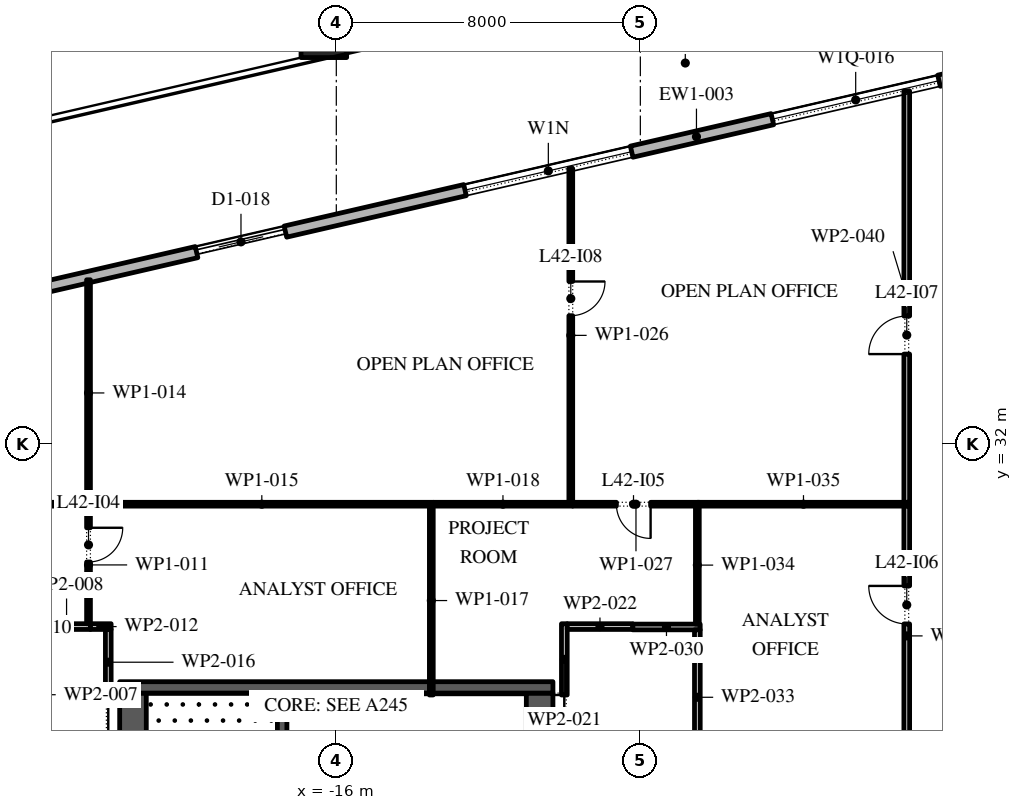
"""IFC4 building model, lengths in metres.
Left out: names, types, materials, properties, quantities, classifications, styles, units other than length and angle.
Written with IfcOpenShell. Run it as: python <this file> out.ifc"""

import sys

from ifc_helpers import new_model, si_unit, direction, frame, frame_2d, origin, origin_2d, place, context, subcontext, project, spatial, rectangle, extrude, element, fill, save


model = new_model("IFC4")
c1 = context("Model", 3, precision=1e-05, world=origin(), true_north=direction((0.0, 1.0)))
c2 = subcontext(c1, "Body", "Model", "MODEL_VIEW")
j1 = project(units=[si_unit("LENGTHUNIT", "METRE"), si_unit("PLANEANGLEUNIT", "RADIAN")], contexts=[c1])
p1 = place(None, origin())
s1 = spatial("IfcSite", under=j1, at=p1, CompositionType="ELEMENT")
p2 = place(p1, origin())
s2 = spatial("IfcBuilding", under=s1, at=p2, CompositionType="ELEMENT")
p3 = place(p2, frame((0.0, 0.0, 192.6)))
s3 = spatial("IfcBuildingStorey", under=s2, at=p3, CompositionType="ELEMENT", Elevation=192.6)
p4 = place(p3, frame((-16.328, 42.772, 0.0), z_axis=(-0.018825755928, 0.08155896722, 0.996490705315), x_axis=(-0.974379530941, -0.22491004798, 0.0)))
e1 = element("IfcColumn", 1, at=p4, inside=s3, PredefinedType="COLUMN", context=c2, shape_type="SweptSolid", body=[
    extrude(rectangle(XDim=1.2, YDim=1.2, at=origin_2d()), origin(), (0.0, 0.0, 1.0), 4.215),
])
p5 = place(p3, frame((17.592, 45.657, 0.0), z_axis=(0.0, 0.0, 1.0), x_axis=(-0.974370243697, -0.224950279389, 0.0)))
e2 = element("IfcWall", 2, at=p5, inside=s3, PredefinedType="STANDARD", context=c2, shape_type="SweptSolid", body=[
    extrude(rectangle(XDim=49.5, YDim=0.3, at=frame_2d((24.75, 0.0))), origin(), (0.0, 0.0, 1.0), 4.0),
])
p6 = place(p5, frame((2.8, 0.0, 0.0)))
e3 = element("IfcOpeningElement", 3, at=p6, cuts=e2, PredefinedType="OPENING", context=c2, shape_type="SweptSolid", body=[
    extrude(rectangle(XDim=2.4, YDim=3.5, at=frame_2d((1.2, 1.75))), frame((0.0, 0.16, 0.0), z_axis=(0.0, -1.0, 0.0), x_axis=(1.0, 0.0, 0.0)), (0.0, 0.0, 1.0), 0.32),
])
p7 = place(p5, frame((9.9, 0.0, 0.45)))
e4 = element("IfcOpeningElement", 4, at=p7, cuts=e2, PredefinedType="OPENING", context=c2, shape_type="SweptSolid", body=[
    extrude(rectangle(XDim=4.5, YDim=2.45, at=frame_2d((2.25, 1.225))), frame((0.0, 0.16, 0.0), z_axis=(0.0, -1.0, 0.0), x_axis=(1.0, 0.0, 0.0)), (0.0, 0.0, 1.0), 0.32),
])
p8 = place(p5, frame((18.2, 0.0, 0.45)))
e5 = element("IfcOpeningElement", 5, at=p8, cuts=e2, PredefinedType="OPENING", context=c2, shape_type="SweptSolid", body=[
    extrude(rectangle(XDim=4.5, YDim=2.45, at=frame_2d((2.25, 1.225))), frame((0.0, 0.16, 0.0), z_axis=(0.0, -1.0, 0.0), x_axis=(1.0, 0.0, 0.0)), (0.0, 0.0, 1.0), 0.32),
])
p9 = place(p5, frame((26.5, 0.0, 0.45)))
e6 = element("IfcOpeningElement", 6, at=p9, cuts=e2, PredefinedType="OPENING", context=c2, shape_type="SweptSolid", body=[
    extrude(rectangle(XDim=4.5, YDim=2.525, at=frame_2d((2.25, 1.262))), frame((0.0, 0.16, 0.0), z_axis=(0.0, -1.0, 0.0), x_axis=(1.0, 0.0, 0.0)), (0.0, 0.0, 1.0), 0.32),
])
p10 = place(p5, frame((35.85, 0.0, 0.0)))
e7 = element("IfcOpeningElement", 7, at=p10, cuts=e2, PredefinedType="OPENING", context=c2, shape_type="SweptSolid", body=[
    extrude(rectangle(XDim=2.4, YDim=3.5, at=frame_2d((1.2, 1.75))), frame((0.0, 0.16, 0.0), z_axis=(0.0, -1.0, 0.0), x_axis=(1.0, 0.0, 0.0)), (0.0, 0.0, 1.0), 0.32),
])
p11 = place(p5, frame((43.1, 0.0, 0.45)))
e8 = element("IfcOpeningElement", 8, at=p11, cuts=e2, PredefinedType="OPENING", context=c2, shape_type="SweptSolid", body=[
    extrude(rectangle(XDim=4.5, YDim=2.675, at=frame_2d((2.25, 1.337))), frame((0.0, 0.16, 0.0), z_axis=(0.0, -1.0, 0.0), x_axis=(1.0, 0.0, 0.0)), (0.0, 0.0, 1.0), 0.32),
])
p12 = place(p3, frame((-33.157, 30.092, 0.0), z_axis=(0.0, 0.0, 1.0), x_axis=(0.224950279389, -0.974370243697, 0.0)))
e9 = element("IfcWall", 9, at=p12, inside=s3, PredefinedType="STANDARD", context=c2, shape_type="SweptSolid", body=[
    extrude(rectangle(XDim=49.5, YDim=0.3, at=frame_2d((24.75, 0.0))), origin(), (0.0, 0.0, 1.0), 4.0),
])
p13 = place(p12, frame((2.207, 0.0, 0.0)))
e10 = element("IfcOpeningElement", 10, at=p13, cuts=e9, PredefinedType="OPENING", context=c2, shape_type="SweptSolid", body=[
    extrude(rectangle(XDim=2.4, YDim=3.5, at=frame_2d((1.2, 1.75))), frame((0.0, 0.16, 0.0), z_axis=(0.0, -1.0, 0.0), x_axis=(1.0, 0.0, 0.0)), (0.0, 0.0, 1.0), 0.32),
])
p14 = place(p12, frame((8.121, 0.0, 0.45)))
e11 = element("IfcOpeningElement", 11, at=p14, cuts=e9, PredefinedType="OPENING", context=c2, shape_type="SweptSolid", body=[
    extrude(rectangle(XDim=4.5, YDim=2.825, at=frame_2d((2.25, 1.413))), frame((0.0, 0.16, 0.0), z_axis=(0.0, -1.0, 0.0), x_axis=(1.0, 0.0, 0.0)), (0.0, 0.0, 1.0), 0.32),
])
p15 = place(p12, frame((15.236, 0.0, 0.45)))
e12 = element("IfcOpeningElement", 12, at=p15, cuts=e9, PredefinedType="OPENING", context=c2, shape_type="SweptSolid", body=[
    extrude(rectangle(XDim=4.5, YDim=2.95, at=frame_2d((2.25, 1.475))), frame((0.0, 0.16, 0.0), z_axis=(0.0, -1.0, 0.0), x_axis=(1.0, 0.0, 0.0)), (0.0, 0.0, 1.0), 0.32),
])
p16 = place(p12, frame((22.35, 0.0, 0.45)))
e13 = element("IfcOpeningElement", 13, at=p16, cuts=e9, PredefinedType="OPENING", context=c2, shape_type="SweptSolid", body=[
    extrude(rectangle(XDim=4.5, YDim=3.0, at=frame_2d((2.25, 1.5))), frame((0.0, 0.16, 0.0), z_axis=(0.0, -1.0, 0.0), x_axis=(1.0, 0.0, 0.0)), (0.0, 0.0, 1.0), 0.32),
])
p17 = place(p12, frame((30.514, 0.0, 0.0)))
e14 = element("IfcOpeningElement", 14, at=p17, cuts=e9, PredefinedType="OPENING", context=c2, shape_type="SweptSolid", body=[
    extrude(rectangle(XDim=2.4, YDim=3.5, at=frame_2d((1.2, 1.75))), frame((0.0, 0.16, 0.0), z_axis=(0.0, -1.0, 0.0), x_axis=(1.0, 0.0, 0.0)), (0.0, 0.0, 1.0), 0.32),
])
p18 = place(p12, frame((36.579, 0.0, 0.45)))
e15 = element("IfcOpeningElement", 15, at=p18, cuts=e9, PredefinedType="OPENING", context=c2, shape_type="SweptSolid", body=[
    extrude(rectangle(XDim=4.5, YDim=3.05, at=frame_2d((2.25, 1.525))), frame((0.0, 0.16, 0.0), z_axis=(0.0, -1.0, 0.0), x_axis=(1.0, 0.0, 0.0)), (0.0, 0.0, 1.0), 0.32),
])
p19 = place(p12, frame((43.693, 0.0, 0.45)))
e16 = element("IfcOpeningElement", 16, at=p19, cuts=e9, PredefinedType="OPENING", context=c2, shape_type="SweptSolid", body=[
    extrude(rectangle(XDim=4.5, YDim=3.05, at=frame_2d((2.25, 1.525))), frame((0.0, 0.16, 0.0), z_axis=(0.0, -1.0, 0.0), x_axis=(1.0, 0.0, 0.0)), (0.0, 0.0, 1.0), 0.32),
])
p20 = place(p3, frame((-21.35, -2.45, 0.0), z_axis=(0.0, 0.0, 1.0), x_axis=(0.0, 1.0, 0.0)))
e17 = element("IfcWall", 17, at=p20, inside=s3, PredefinedType="SHEAR", context=c2, shape_type="SweptSolid", body=[
    extrude(rectangle(XDim=27.9, YDim=0.7, at=frame_2d((13.95, 0.0))), origin(), (0.0, 0.0, 1.0), 4.0),
])
p21 = place(p20, frame((5.05, 0.0, 0.0)))
e18 = element("IfcOpeningElement", 18, at=p21, cuts=e17, PredefinedType="OPENING", context=c2, shape_type="SweptSolid", body=[
    extrude(rectangle(XDim=1.2, YDim=2.1, at=frame_2d((0.6, 1.05))), frame((0.0, 0.36, 0.0), z_axis=(0.0, -1.0, 0.0), x_axis=(1.0, 0.0, 0.0)), (0.0, 0.0, 1.0), 0.72),
])
p22 = place(p20, frame((21.65, 0.0, 0.0)))
e19 = element("IfcOpeningElement", 19, at=p22, cuts=e17, PredefinedType="OPENING", context=c2, shape_type="SweptSolid", body=[
    extrude(rectangle(XDim=1.2, YDim=2.1, at=frame_2d((0.6, 1.05))), frame((0.0, 0.36, 0.0), z_axis=(0.0, -1.0, 0.0), x_axis=(1.0, 0.0, 0.0)), (0.0, 0.0, 1.0), 0.72),
])
p23 = place(p3, frame((-10.65, -2.45, 0.0), z_axis=(0.0, 0.0, 1.0), x_axis=(0.0, 1.0, 0.0)))
e20 = element("IfcWall", 20, at=p23, inside=s3, PredefinedType="SHEAR", context=c2, shape_type="SweptSolid", body=[
    extrude(rectangle(XDim=27.9, YDim=0.7, at=frame_2d((13.95, 0.0))), origin(), (0.0, 0.0, 1.0), 4.0),
])
p24 = place(p23, frame((23.65, 0.0, 0.0)))
e21 = element("IfcOpeningElement", 21, at=p24, cuts=e20, PredefinedType="OPENING", context=c2, shape_type="SweptSolid", body=[
    extrude(rectangle(XDim=2.4, YDim=2.1, at=frame_2d((1.2, 1.05))), frame((0.0, 0.36, 0.0), z_axis=(0.0, -1.0, 0.0), x_axis=(1.0, 0.0, 0.0)), (0.0, 0.0, 1.0), 0.72),
])
p25 = place(p23, frame((1.087, 0.0, 0.0)))
e22 = element("IfcOpeningElement", 22, at=p25, cuts=e20, PredefinedType="OPENING", context=c2, shape_type="SweptSolid", body=[
    extrude(rectangle(XDim=0.9, YDim=2.1, at=frame_2d((0.45, 1.05))), frame((0.0, 0.36, 0.0), z_axis=(0.0, -1.0, 0.0), x_axis=(1.0, 0.0, 0.0)), (0.0, 0.0, 1.0), 0.72),
])
p26 = place(p23, frame((4.262, 0.0, 0.0)))
e23 = element("IfcOpeningElement", 23, at=p26, cuts=e20, PredefinedType="OPENING", context=c2, shape_type="SweptSolid", body=[
    extrude(rectangle(XDim=1.0, YDim=2.1, at=frame_2d((0.5, 1.05))), frame((0.0, 0.36, 0.0), z_axis=(0.0, -1.0, 0.0), x_axis=(1.0, 0.0, 0.0)), (0.0, 0.0, 1.0), 0.72),
])
p27 = place(p3, frame((-21.7, 25.6, 0.0), z_axis=(0.0, 0.0, 1.0), x_axis=(1.0, 0.0, 0.0)))
e24 = element("IfcWall", 24, at=p27, inside=s3, PredefinedType="SHEAR", context=c2, shape_type="SweptSolid", body=[
    extrude(rectangle(XDim=11.4, YDim=0.3, at=frame_2d((5.7, 0.0))), origin(), (0.0, 0.0, 1.0), 4.0),
])
p28 = place(p3, frame((-17.425, 19.15, 0.0), z_axis=(0.0, 0.0, 1.0), x_axis=(0.0, 1.0, 0.0)))
e25 = element("IfcWall", 25, at=p28, inside=s3, PredefinedType="SHEAR", context=c2, shape_type="SweptSolid", body=[
    extrude(rectangle(XDim=6.3, YDim=0.25, at=frame_2d((3.15, 0.0))), origin(), (0.0, 0.0, 1.0), 4.0),
])
p29 = place(p28, frame((0.05, 0.0, 0.0)))
e26 = element("IfcOpeningElement", 26, at=p29, cuts=e25, PredefinedType="OPENING", context=c2, shape_type="SweptSolid", body=[
    extrude(rectangle(XDim=1.2, YDim=2.1, at=frame_2d((0.6, 1.05))), frame((0.0, 0.135, 0.0), z_axis=(0.0, -1.0, 0.0), x_axis=(1.0, 0.0, 0.0)), (0.0, 0.0, 1.0), 0.27),
])
p30 = place(p3, frame((-23.725, 27.2, 0.0), z_axis=(0.0, 0.0, 1.0), x_axis=(1.0, 0.0, 0.0)))
e27 = element("IfcWall", 27, at=p30, inside=s3, PredefinedType="PARTITIONING", context=c2, shape_type="SweptSolid", body=[
    extrude(rectangle(XDim=1.255, YDim=0.15, at=frame_2d((0.627, 0.0))), origin(), (0.0, 0.0, 1.0), 4.0),
])
p31 = place(p3, frame((-22.52, 27.275, 0.0), z_axis=(0.0, 0.0, 1.0), x_axis=(0.0, 1.0, 0.0)))
e28 = element("IfcWall", 28, at=p31, inside=s3, PredefinedType="PARTITIONING", context=c2, shape_type="SweptSolid", body=[
    extrude(rectangle(XDim=3.095, YDim=0.1, at=frame_2d((1.548, 0.0))), origin(), (0.0, 0.0, 1.0), 4.0),
])
p32 = place(p31, frame((1.625, 0.0, 0.0)))
e29 = element("IfcOpeningElement", 29, at=p32, cuts=e28, PredefinedType="OPENING", context=c2, shape_type="SweptSolid", body=[
    extrude(rectangle(XDim=0.9, YDim=2.1, at=frame_2d((0.45, 1.05))), frame((0.0, 0.06, 0.0), z_axis=(0.0, -1.0, 0.0), x_axis=(1.0, 0.0, 0.0)), (0.0, 0.0, 1.0), 0.12),
])
p33 = place(p3, frame((-22.47, 27.2, 0.0), z_axis=(0.0, 0.0, 1.0), x_axis=(1.0, 0.0, 0.0)))
e30 = element("IfcWall", 30, at=p33, inside=s3, PredefinedType="PARTITIONING", context=c2, shape_type="SweptSolid", body=[
    extrude(rectangle(XDim=0.545, YDim=0.15, at=frame_2d((0.272, 0.0))), origin(), (0.0, 0.0, 1.0), 4.0),
])
p34 = place(p3, frame((-22.57, 30.42, 0.0), z_axis=(0.0, 0.0, 1.0), x_axis=(-1.0, 0.0, 0.0)))
e31 = element("IfcWall", 31, at=p34, inside=s3, PredefinedType="PARTITIONING", context=c2, shape_type="SweptSolid", body=[
    extrude(rectangle(XDim=9.412, YDim=0.1, at=frame_2d((4.706, 0.0))), origin(), (0.0, 0.0, 1.0), 4.0),
])
p35 = place(p34, frame((2.65, 0.0, 0.0)))
e32 = element("IfcOpeningElement", 32, at=p35, cuts=e31, PredefinedType="OPENING", context=c2, shape_type="SweptSolid", body=[
    extrude(rectangle(XDim=0.9, YDim=2.1, at=frame_2d((0.45, 1.05))), frame((0.0, 0.06, 0.0), z_axis=(0.0, -1.0, 0.0), x_axis=(1.0, 0.0, 0.0)), (0.0, 0.0, 1.0), 0.12),
])
p36 = place(p3, frame((-22.52, 30.37, 0.0), z_axis=(0.0, 0.0, 1.0), x_axis=(0.0, 1.0, 0.0)))
e33 = element("IfcWall", 33, at=p36, inside=s3, PredefinedType="PARTITIONING", context=c2, shape_type="SweptSolid", body=[
    extrude(rectangle(XDim=5.955, YDim=0.1, at=frame_2d((2.978, 0.0))), origin(), (0.0, 0.0, 1.0), 4.0),
])
p37 = place(p3, frame((-22.47, 30.42, 0.0), z_axis=(0.0, 0.0, 1.0), x_axis=(1.0, 0.0, 0.0)))
e34 = element("IfcWall", 34, at=p37, inside=s3, PredefinedType="PARTITIONING", context=c2, shape_type="SweptSolid", body=[
    extrude(rectangle(XDim=9.02, YDim=0.1, at=frame_2d((4.51, 0.0))), origin(), (0.0, 0.0, 1.0), 4.0),
])
p38 = place(p3, frame((-22.0, 27.125, 0.0), z_axis=(0.0, 0.0, 1.0), x_axis=(0.0, -1.0, 0.0)))
e35 = element("IfcWall", 35, at=p38, inside=s3, PredefinedType="PARTITIONING", context=c2, shape_type="SweptSolid", body=[
    extrude(rectangle(XDim=1.725, YDim=0.15, at=frame_2d((0.863, 0.0))), origin(), (0.0, 0.0, 1.0), 4.0),
])
p39 = place(p3, frame((-13.5, 30.37, 0.0), z_axis=(0.0, 0.0, 1.0), x_axis=(0.0, -1.0, 0.0)))
e36 = element("IfcWall", 36, at=p39, inside=s3, PredefinedType="PARTITIONING", context=c2, shape_type="SweptSolid", body=[
    extrude(rectangle(XDim=4.97, YDim=0.1, at=frame_2d((2.485, 0.0))), origin(), (0.0, 0.0, 1.0), 4.0),
])
p40 = place(p3, frame((-13.45, 30.42, 0.0), z_axis=(0.0, 0.0, 1.0), x_axis=(1.0, 0.0, 0.0)))
e37 = element("IfcWall", 37, at=p40, inside=s3, PredefinedType="PARTITIONING", context=c2, shape_type="SweptSolid", body=[
    extrude(rectangle(XDim=3.67, YDim=0.1, at=frame_2d((1.835, 0.0))), origin(), (0.0, 0.0, 1.0), 4.0),
])
p41 = place(p3, frame((-10.0, 25.4, 0.0), z_axis=(0.0, 0.0, 1.0), x_axis=(0.0, 1.0, 0.0)))
e38 = element("IfcWall", 38, at=p41, inside=s3, PredefinedType="PARTITIONING", context=c2, shape_type="SweptSolid", body=[
    extrude(rectangle(XDim=1.875, YDim=0.15, at=frame_2d((0.938, 0.0))), origin(), (0.0, 0.0, 1.0), 4.0),
])
p42 = place(p3, frame((-9.925, 27.2, 0.0), z_axis=(0.0, 0.0, 1.0), x_axis=(1.0, 0.0, 0.0)))
e39 = element("IfcWall", 39, at=p42, inside=s3, PredefinedType="PARTITIONING", context=c2, shape_type="SweptSolid", body=[
    extrude(rectangle(XDim=1.725, YDim=0.15, at=frame_2d((0.863, 0.0))), origin(), (0.0, 0.0, 1.0), 4.0),
])
p43 = place(p3, frame((-9.83, 30.47, 0.0), z_axis=(0.0, 0.0, 1.0), x_axis=(0.0, 1.0, 0.0)))
e40 = element("IfcWall", 40, at=p43, inside=s3, PredefinedType="PARTITIONING", context=c2, shape_type="SweptSolid", body=[
    extrude(rectangle(XDim=8.785, YDim=0.1, at=frame_2d((4.393, 0.0))), origin(), (0.0, 0.0, 1.0), 4.0),
])
p44 = place(p43, frame((4.91, 0.0, 0.0)))
e41 = element("IfcOpeningElement", 41, at=p44, cuts=e40, PredefinedType="OPENING", context=c2, shape_type="SweptSolid", body=[
    extrude(rectangle(XDim=0.9, YDim=2.1, at=frame_2d((0.45, 1.05))), frame((0.0, 0.06, 0.0), z_axis=(0.0, -1.0, 0.0), x_axis=(1.0, 0.0, 0.0)), (0.0, 0.0, 1.0), 0.12),
])
p45 = place(p3, frame((-9.78, 30.42, 0.0), z_axis=(0.0, 0.0, 1.0), x_axis=(1.0, 0.0, 0.0)))
e42 = element("IfcWall", 42, at=p45, inside=s3, PredefinedType="PARTITIONING", context=c2, shape_type="SweptSolid", body=[
    extrude(rectangle(XDim=3.33, YDim=0.1, at=frame_2d((1.665, 0.0))), origin(), (0.0, 0.0, 1.0), 4.0),
])
p46 = place(p45, frame((1.15, 0.0, 0.0)))
e43 = element("IfcOpeningElement", 43, at=p46, cuts=e42, PredefinedType="OPENING", context=c2, shape_type="SweptSolid", body=[
    extrude(rectangle(XDim=0.9, YDim=2.1, at=frame_2d((0.45, 1.05))), frame((0.0, 0.06, 0.0), z_axis=(0.0, -1.0, 0.0), x_axis=(1.0, 0.0, 0.0)), (0.0, 0.0, 1.0), 0.12),
])
p47 = place(p3, frame((-8.2, 27.19, 0.0), z_axis=(0.0, 0.0, 1.0), x_axis=(1.0, 0.0, 0.0)))
e44 = element("IfcWall", 44, at=p47, inside=s3, PredefinedType="PARTITIONING", context=c2, shape_type="SweptSolid", body=[
    extrude(rectangle(XDim=1.775, YDim=0.15, at=frame_2d((0.887, 0.0))), origin(), (0.0, 0.0, 1.0), 4.0),
])
p48 = place(p3, frame((-6.5, 27.115, 0.0), z_axis=(0.0, 0.0, 1.0), x_axis=(0.0, -1.0, 0.0)))
e45 = element("IfcWall", 45, at=p48, inside=s3, PredefinedType="PARTITIONING", context=c2, shape_type="SweptSolid", body=[
    extrude(rectangle(XDim=3.55, YDim=0.15, at=frame_2d((1.775, 0.0))), origin(), (0.0, 0.0, 1.0), 4.0),
])
p49 = place(p3, frame((-6.5, 30.37, 0.0), z_axis=(0.0, 0.0, 1.0), x_axis=(0.0, -1.0, 0.0)))
e46 = element("IfcWall", 46, at=p49, inside=s3, PredefinedType="PARTITIONING", context=c2, shape_type="SweptSolid", body=[
    extrude(rectangle(XDim=3.105, YDim=0.1, at=frame_2d((1.553, 0.0))), origin(), (0.0, 0.0, 1.0), 4.0),
])
p50 = place(p3, frame((-6.5, 30.42, 0.0), z_axis=(0.0, 0.0, 1.0), x_axis=(1.0, 0.0, 0.0)))
e47 = element("IfcWall", 47, at=p50, inside=s3, PredefinedType="PARTITIONING", context=c2, shape_type="SweptSolid", body=[
    extrude(rectangle(XDim=5.585, YDim=0.1, at=frame_2d((2.792, 0.0))), origin(), (0.0, 0.0, 1.0), 4.0),
])
p51 = place(p3, frame((-0.99, 23.54, 0.0), z_axis=(0.0, 0.0, 1.0), x_axis=(0.0, 1.0, 0.0)))
e48 = element("IfcWall", 48, at=p51, inside=s3, PredefinedType="PARTITIONING", context=c2, shape_type="SweptSolid", body=[
    extrude(rectangle(XDim=6.83, YDim=0.15, at=frame_2d((3.415, 0.0))), origin(), (0.0, 0.0, 1.0), 4.0),
])
p52 = place(p51, frame((3.73, 0.0, 0.0)))
e49 = element("IfcOpeningElement", 49, at=p52, cuts=e48, PredefinedType="OPENING", context=c2, shape_type="SweptSolid", body=[
    extrude(rectangle(XDim=1.0, YDim=2.1, at=frame_2d((0.5, 1.05))), frame((0.0, 0.085, 0.0), z_axis=(0.0, -1.0, 0.0), x_axis=(1.0, 0.0, 0.0)), (0.0, 0.0, 1.0), 0.17),
])
p53 = place(p3, frame((-0.99, 30.47, 0.0), z_axis=(0.0, 0.0, 1.0), x_axis=(0.0, 1.0, 0.0)))
e50 = element("IfcWall", 50, at=p53, inside=s3, PredefinedType="PARTITIONING", context=c2, shape_type="SweptSolid", body=[
    extrude(rectangle(XDim=10.826, YDim=0.15, at=frame_2d((5.413, 0.0))), origin(), (0.0, 0.0, 1.0), 4.0),
])
p54 = place(p53, frame((3.9, 0.0, 0.0)))
e51 = element("IfcOpeningElement", 51, at=p54, cuts=e50, PredefinedType="OPENING", context=c2, shape_type="SweptSolid", body=[
    extrude(rectangle(XDim=1.0, YDim=2.1, at=frame_2d((0.5, 1.05))), frame((0.0, 0.085, 0.0), z_axis=(0.0, -1.0, 0.0), x_axis=(1.0, 0.0, 0.0)), (0.0, 0.0, 1.0), 0.17),
])
p55 = place(p8, origin())
e52 = element("IfcWindow", 52, at=p55, inside=s3, PartitioningType="DOUBLE_PANEL_VERTICAL", PredefinedType="WINDOW", context=c2, shape_type="SweptSolid", body=[
    extrude(rectangle(XDim=4.5, YDim=2.45, at=frame_2d((2.25, 1.225))), frame((0.0, 0.03, 0.0), z_axis=(0.0, -1.0, 0.0), x_axis=(1.0, 0.0, 0.0)), (0.0, 0.0, 1.0), 0.06),
])
fill(e5, e52)
p56 = place(p9, origin())
e53 = element("IfcWindow", 53, at=p56, inside=s3, PartitioningType="DOUBLE_PANEL_VERTICAL", PredefinedType="WINDOW", context=c2, shape_type="SweptSolid", body=[
    extrude(rectangle(XDim=4.5, YDim=2.525, at=frame_2d((2.25, 1.262))), frame((0.0, 0.03, 0.0), z_axis=(0.0, -1.0, 0.0), x_axis=(1.0, 0.0, 0.0)), (0.0, 0.0, 1.0), 0.06),
])
fill(e6, e53)
p57 = place(p10, origin())
e54 = element("IfcDoor", 54, at=p57, inside=s3, OperationType="DOUBLE_DOOR_SLIDING", PredefinedType="DOOR", context=c2, shape_type="SweptSolid", body=[
    extrude(rectangle(XDim=2.4, YDim=3.5, at=frame_2d((1.2, 1.75))), frame((0.0, 0.025, 0.0), z_axis=(0.0, -1.0, 0.0), x_axis=(1.0, 0.0, 0.0)), (0.0, 0.0, 1.0), 0.05),
])
fill(e7, e54)
p58 = place(p32, frame((0.9, 0.0, 0.0), z_axis=(0.0, 0.0, 1.0), x_axis=(-1.0, 0.0, 0.0)))
e55 = element("IfcDoor", 55, at=p58, inside=s3, OperationType="SINGLE_SWING_RIGHT", PredefinedType="DOOR", context=c2, shape_type="SweptSolid", body=[
    extrude(rectangle(XDim=0.9, YDim=2.1, at=frame_2d((0.45, 1.05))), frame((0.0, 0.025, 0.0), z_axis=(0.0, -1.0, 0.0), x_axis=(1.0, 0.0, 0.0)), (0.0, 0.0, 1.0), 0.05),
])
fill(e29, e55)
p59 = place(p46, frame((0.9, 0.0, 0.0), z_axis=(0.0, 0.0, 1.0), x_axis=(-1.0, 0.0, 0.0)))
e56 = element("IfcDoor", 56, at=p59, inside=s3, OperationType="SINGLE_SWING_RIGHT", PredefinedType="DOOR", context=c2, shape_type="SweptSolid", body=[
    extrude(rectangle(XDim=0.9, YDim=2.1, at=frame_2d((0.45, 1.05))), frame((0.0, 0.025, 0.0), z_axis=(0.0, -1.0, 0.0), x_axis=(1.0, 0.0, 0.0)), (0.0, 0.0, 1.0), 0.05),
])
fill(e43, e56)
p60 = place(p52, origin())
e57 = element("IfcDoor", 57, at=p60, inside=s3, OperationType="SINGLE_SWING_LEFT", PredefinedType="DOOR", context=c2, shape_type="SweptSolid", body=[
    extrude(rectangle(XDim=1.0, YDim=2.1, at=frame_2d((0.5, 1.05))), frame((0.0, 0.025, 0.0), z_axis=(0.0, -1.0, 0.0), x_axis=(1.0, 0.0, 0.0)), (0.0, 0.0, 1.0), 0.05),
])
fill(e49, e57)
p61 = place(p54, origin())
e58 = element("IfcDoor", 58, at=p61, inside=s3, OperationType="SINGLE_SWING_RIGHT", PredefinedType="DOOR", context=c2, shape_type="SweptSolid", body=[
    extrude(rectangle(XDim=1.0, YDim=2.1, at=frame_2d((0.5, 1.05))), frame((0.0, 0.025, 0.0), z_axis=(0.0, -1.0, 0.0), x_axis=(1.0, 0.0, 0.0)), (0.0, 0.0, 1.0), 0.05),
])
fill(e51, e58)
p62 = place(p44, frame((0.9, 0.0, 0.0), z_axis=(0.0, 0.0, 1.0), x_axis=(-1.0, 0.0, 0.0)))
e59 = element("IfcDoor", 59, at=p62, inside=s3, OperationType="SINGLE_SWING_RIGHT", PredefinedType="DOOR", context=c2, shape_type="SweptSolid", body=[
    extrude(rectangle(XDim=0.9, YDim=2.1, at=frame_2d((0.45, 1.05))), frame((0.0, 0.025, 0.0), z_axis=(0.0, -1.0, 0.0), x_axis=(1.0, 0.0, 0.0)), (0.0, 0.0, 1.0), 0.05),
])
fill(e41, e59)
save(model, sys.argv[1])
